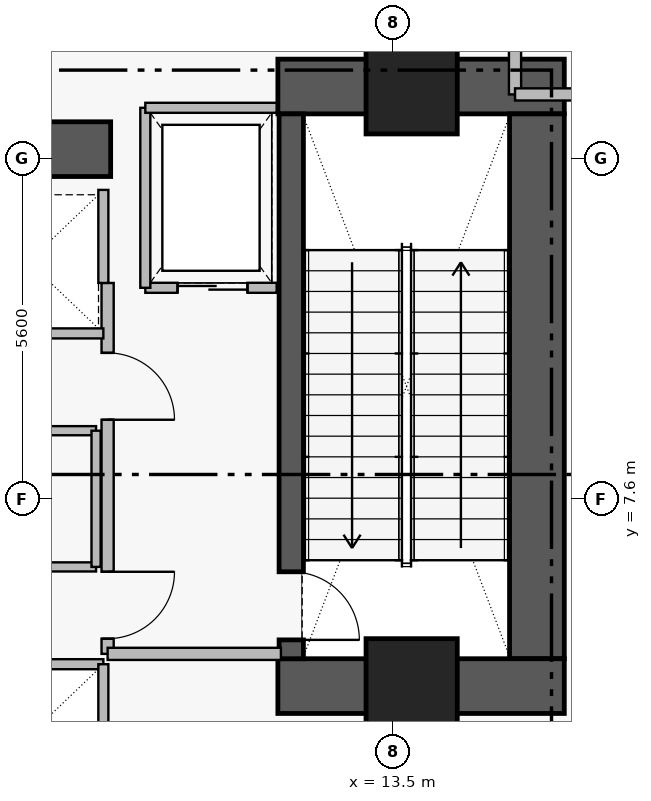
"""IFC4 building model, lengths in metres.
Left out: names, types, materials, properties, quantities, classifications, styles, units other than length and angle.
Written with IfcOpenShell. Run it as: python <this file> out.ifc"""

import sys

from ifc_helpers import new_model, si_unit, direction, frame, frame_2d, origin, origin_2d, place, context, subcontext, project, spatial, rectangle, extrude, element, fill, save


model = new_model("IFC4")
c1 = context("Model", 3, precision=1e-05, world=origin(), true_north=direction((0.0, 1.0)))
c2 = subcontext(c1, "Body", "Model", "MODEL_VIEW")
j1 = project(units=[si_unit("LENGTHUNIT", "METRE"), si_unit("PLANEANGLEUNIT", "RADIAN")], contexts=[c1])
p1 = place(None, origin())
s1 = spatial("IfcSite", under=j1, at=p1, CompositionType="ELEMENT")
p2 = place(p1, origin())
s2 = spatial("IfcBuilding", under=s1, at=p2, CompositionType="ELEMENT")
p3 = place(p2, frame((0.0, 0.0, 89.65)))
s3 = spatial("IfcBuildingStorey", under=s2, at=p3, CompositionType="ELEMENT", Elevation=89.65)
p4 = place(p3, frame((11.6, 14.38, 0.0), z_axis=(0.0, 0.0, 1.0), x_axis=(1.0, 0.0, 0.0)))
e1 = element("IfcWall", 1, at=p4, inside=s3, PredefinedType="SHEAR", context=c2, shape_type="SweptSolid", body=[
    extrude(rectangle(XDim=4.71, YDim=0.9, at=frame_2d((2.355, 0.0))), origin(), (0.0, 0.0, 1.0), 5.81),
])
p5 = place(p3, frame((15.86, 4.97, 0.0), z_axis=(0.0, 0.0, 1.0), x_axis=(0.0, 1.0, 0.0)))
e2 = element("IfcWall", 2, at=p5, inside=s3, PredefinedType="SHEAR", context=c2, shape_type="SweptSolid", body=[
    extrude(rectangle(XDim=8.96, YDim=0.9, at=frame_2d((4.48, 0.0))), origin(), (0.0, 0.0, 1.0), 5.81),
])
p6 = place(p3, frame((11.6, 4.52, 0.0), z_axis=(0.0, 0.0, 1.0), x_axis=(1.0, 0.0, 0.0)))
e3 = element("IfcWall", 3, at=p6, inside=s3, PredefinedType="SHEAR", context=c2, shape_type="SweptSolid", body=[
    extrude(rectangle(XDim=4.71, YDim=0.9, at=frame_2d((2.355, 0.0))), origin(), (0.0, 0.0, 1.0), 5.81),
])
p7 = place(p3, frame((1.25, 13.35, 0.0), z_axis=(0.0, 0.0, 1.0), x_axis=(1.0, 0.0, 0.0)))
e4 = element("IfcWall", 4, at=p7, inside=s3, PredefinedType="SHEAR", context=c2, shape_type="SweptSolid", body=[
    extrude(rectangle(XDim=7.6, YDim=0.9, at=frame_2d((3.8, 0.0))), origin(), (0.0, 0.0, 1.0), 5.74),
])
p8 = place(p3, frame((11.82, 13.93, 0.0), z_axis=(0.0, 0.0, 1.0), x_axis=(0.0, -1.0, 0.0)))
e5 = element("IfcWall", 5, at=p8, inside=s3, PredefinedType="SHEAR", context=c2, shape_type="SweptSolid", body=[
    extrude(rectangle(XDim=8.96, YDim=0.4, at=frame_2d((4.48, 0.0))), origin(), (0.0, 0.0, 1.0), 5.81),
])
p9 = place(p8, frame((7.53, 0.0, 0.0)))
e6 = element("IfcOpeningElement", 6, at=p9, cuts=e5, PredefinedType="OPENING", context=c2, shape_type="SweptSolid", body=[
    extrude(rectangle(XDim=1.12, YDim=2.22, at=frame_2d((0.56, 1.11))), frame((0.0, 0.21, 0.0), z_axis=(0.0, -1.0, 0.0), x_axis=(1.0, 0.0, 0.0)), (0.0, 0.0, 1.0), 0.42),
])
for number, where, z_axis, x_axis in (
    (7, (13.8, 14.35, 0.0), (0.0, 0.0, 1.0), (1.0, 0.0, 0.0)),
    (8, (13.8, 4.55, 0.0), (0.0, 0.0, 1.0), (1.0, 0.0, 0.0)),
):
    element("IfcColumn", number, at=place(p3, frame(where, z_axis=z_axis, x_axis=x_axis)), inside=s3, PredefinedType="COLUMN", context=c2, shape_type="SweptSolid", body=[
        extrude(rectangle(XDim=1.5, YDim=1.5, at=origin_2d()), origin(), (0.0, 0.0, 1.0), 6.0),
    ])
p10 = place(p3, frame((8.8, 11.15, 0.0), z_axis=(0.0, 0.0, 1.0), x_axis=(0.0, -1.0, 0.0)))
e9 = element("IfcWall", 9, at=p10, inside=s3, PredefinedType="PARTITIONING", context=c2, shape_type="SweptSolid", body=[
    extrude(rectangle(XDim=6.1, YDim=0.2, at=frame_2d((3.05, 0.0))), origin(), (0.0, 0.0, 1.0), 5.74),
])
p11 = place(p10, frame((1.15, 0.0, 0.0)))
e10 = element("IfcOpeningElement", 10, at=p11, cuts=e9, PredefinedType="OPENING", context=c2, shape_type="SweptSolid", body=[
    extrude(rectangle(XDim=1.1, YDim=2.2, at=frame_2d((0.55, 1.1))), frame((0.0, 0.11, 0.0), z_axis=(0.0, -1.0, 0.0), x_axis=(1.0, 0.0, 0.0)), (0.0, 0.0, 1.0), 0.22),
])
p12 = place(p10, frame((4.75, 0.0, 0.0)))
e11 = element("IfcOpeningElement", 11, at=p12, cuts=e9, PredefinedType="OPENING", context=c2, shape_type="SweptSolid", body=[
    extrude(rectangle(XDim=1.1, YDim=2.2, at=frame_2d((0.55, 1.1))), frame((0.0, 0.11, 0.0), z_axis=(0.0, -1.0, 0.0), x_axis=(1.0, 0.0, 0.0)), (0.0, 0.0, 1.0), 0.22),
])
p13 = place(p3, frame((9.42, 11.07, 0.0), z_axis=(0.0, 0.0, 1.0), x_axis=(1.0, 0.0, 0.0)))
e12 = element("IfcWall", 12, at=p13, inside=s3, PredefinedType="PARTITIONING", context=c2, shape_type="SweptSolid", body=[
    extrude(rectangle(XDim=2.16, YDim=0.165, at=frame_2d((1.08, 0.0))), origin(), (0.0, 0.0, 1.0), 5.74),
])
p14 = place(p13, frame((0.53, 0.0, 0.0)))
e13 = element("IfcOpeningElement", 13, at=p14, cuts=e12, PredefinedType="OPENING", context=c2, shape_type="SweptSolid", body=[
    extrude(rectangle(XDim=1.15, YDim=2.25, at=frame_2d((0.575, 1.125))), frame((0.0, 0.093, 0.0), z_axis=(0.0, -1.0, 0.0), x_axis=(1.0, 0.0, 0.0)), (0.0, 0.0, 1.0), 0.185),
])
p15 = place(p3, frame((4.37, 6.48, 0.0), z_axis=(0.0, 0.0, 1.0), x_axis=(1.0, 0.0, 0.0)))
e14 = element("IfcWall", 14, at=p15, inside=s3, PredefinedType="PARTITIONING", context=c2, shape_type="SweptSolid", body=[
    extrude(rectangle(XDim=4.24, YDim=0.15, at=frame_2d((2.12, 0.0))), origin(), (0.0, 0.0, 1.0), 5.74),
])
p16 = place(p15, frame((1.67, 0.0, 0.0)))
e15 = element("IfcOpeningElement", 15, at=p16, cuts=e14, PredefinedType="OPENING", context=c2, shape_type="SweptSolid", body=[
    extrude(rectangle(XDim=0.9, YDim=2.15, at=frame_2d((0.45, 1.075))), frame((0.0, 0.085, 0.0), z_axis=(0.0, -1.0, 0.0), x_axis=(1.0, 0.0, 0.0)), (0.0, 0.0, 1.0), 0.17),
])
p17 = place(p3, frame((15.5, 19.3, 0.0), z_axis=(0.0, 0.0, 1.0), x_axis=(0.0, -1.0, 0.0)))
e16 = element("IfcWall", 16, at=p17, inside=s3, PredefinedType="PARTITIONING", context=c2, shape_type="SweptSolid", body=[
    extrude(rectangle(XDim=5.05, YDim=0.2, at=frame_2d((2.525, 0.0))), origin(), (0.0, 0.0, 1.0), 5.74),
])
p18 = place(p17, frame((2.7, 0.0, 0.0)))
e17 = element("IfcOpeningElement", 17, at=p18, cuts=e16, PredefinedType="OPENING", context=c2, shape_type="SweptSolid", body=[
    extrude(rectangle(XDim=1.1, YDim=2.2, at=frame_2d((0.55, 1.1))), frame((0.0, 0.11, 0.0), z_axis=(0.0, -1.0, 0.0), x_axis=(1.0, 0.0, 0.0)), (0.0, 0.0, 1.0), 0.22),
])
p19 = place(p3, frame((8.8, 5.05, 0.0), z_axis=(0.0, 0.0, 1.0), x_axis=(1.0, 0.0, 0.0)))
e18 = element("IfcWall", 18, at=p19, inside=s3, PredefinedType="PARTITIONING", context=c2, shape_type="SweptSolid", body=[
    extrude(rectangle(XDim=2.85, YDim=0.2, at=frame_2d((1.425, 0.0))), origin(), (0.0, 0.0, 1.0), 5.74),
])
p20 = place(p3, frame((9.42, 11.07, 0.0), z_axis=(0.0, 0.0, 1.0), x_axis=(0.0, 1.0, 0.0)))
e19 = element("IfcWall", 19, at=p20, inside=s3, PredefinedType="PARTITIONING", context=c2, shape_type="SweptSolid", body=[
    extrude(rectangle(XDim=2.96, YDim=0.165, at=frame_2d((1.48, 0.0))), origin(), (0.0, 0.0, 1.0), 5.74),
])
p21 = place(p3, frame((9.42, 14.03, 0.0), z_axis=(0.0, 0.0, 1.0), x_axis=(1.0, 0.0, 0.0)))
e20 = element("IfcWall", 20, at=p21, inside=s3, PredefinedType="PARTITIONING", context=c2, shape_type="SweptSolid", body=[
    extrude(rectangle(XDim=2.16, YDim=0.165, at=frame_2d((1.08, 0.0))), origin(), (0.0, 0.0, 1.0), 5.74),
])
p22 = place(p3, frame((6.25, 4.88, 0.0), z_axis=(0.0, 0.0, 1.0), x_axis=(1.0, 0.0, 0.0)))
e21 = element("IfcWall", 21, at=p22, inside=s3, PredefinedType="PARTITIONING", context=c2, shape_type="SweptSolid", body=[
    extrude(rectangle(XDim=2.48, YDim=0.165, at=frame_2d((1.24, 0.0))), origin(), (0.0, 0.0, 1.0), 5.74),
])
p23 = place(p3, frame((8.73, 2.52, 0.0), z_axis=(0.0, 0.0, 1.0), x_axis=(0.0, 1.0, 0.0)))
e22 = element("IfcWall", 22, at=p23, inside=s3, PredefinedType="PARTITIONING", context=c2, shape_type="SweptSolid", body=[
    extrude(rectangle(XDim=2.36, YDim=0.165, at=frame_2d((1.18, 0.0))), origin(), (0.0, 0.0, 1.0), 5.74),
])
p24 = place(p3, frame((6.25, 10.32, 0.0), z_axis=(0.0, 0.0, 1.0), x_axis=(1.0, 0.0, 0.0)))
e23 = element("IfcWall", 23, at=p24, inside=s3, PredefinedType="PARTITIONING", context=c2, shape_type="SweptSolid", body=[
    extrude(rectangle(XDim=2.48, YDim=0.165, at=frame_2d((1.24, 0.0))), origin(), (0.0, 0.0, 1.0), 5.74),
])
p25 = place(p3, frame((8.73, 11.15, 0.0), z_axis=(0.0, 0.0, 1.0), x_axis=(0.0, 1.0, 0.0)))
e24 = element("IfcWall", 24, at=p25, inside=s3, PredefinedType="PARTITIONING", context=c2, shape_type="SweptSolid", body=[
    extrude(rectangle(XDim=1.53, YDim=0.165, at=frame_2d((0.765, 0.0))), origin(), (0.0, 0.0, 1.0), 5.74),
])
p26 = place(p3, frame((4.37, 8.72, 0.0), z_axis=(0.0, 0.0, 1.0), x_axis=(1.0, 0.0, 0.0)))
e25 = element("IfcWall", 25, at=p26, inside=s3, PredefinedType="PARTITIONING", context=c2, shape_type="SweptSolid", body=[
    extrude(rectangle(XDim=4.24, YDim=0.15, at=frame_2d((2.12, 0.0))), origin(), (0.0, 0.0, 1.0), 5.74),
])
p27 = place(p3, frame((8.61, 6.48, 0.0), z_axis=(0.0, 0.0, 1.0), x_axis=(0.0, 1.0, 0.0)))
e26 = element("IfcWall", 26, at=p27, inside=s3, PredefinedType="PARTITIONING", context=c2, shape_type="SweptSolid", body=[
    extrude(rectangle(XDim=2.24, YDim=0.15, at=frame_2d((1.12, 0.0))), origin(), (0.0, 0.0, 1.0), 5.74),
])
p28 = place(p3, frame((15.5, 14.25, 0.0), z_axis=(0.0, 0.0, 1.0), x_axis=(1.0, 0.0, 0.0)))
e27 = element("IfcWall", 27, at=p28, inside=s3, PredefinedType="PARTITIONING", context=c2, shape_type="SweptSolid", body=[
    extrude(rectangle(XDim=5.0, YDim=0.2, at=frame_2d((2.5, 0.0))), origin(), (0.0, 0.0, 1.0), 5.74),
])
p29 = place(p9, origin())
e28 = element("IfcDoor", 28, at=p29, inside=s3, OperationType="SINGLE_SWING_RIGHT", PredefinedType="DOOR", context=c2, shape_type="SweptSolid", body=[
    extrude(rectangle(XDim=1.12, YDim=2.22, at=frame_2d((0.56, 1.11))), frame((0.0, 0.025, 0.0), z_axis=(0.0, -1.0, 0.0), x_axis=(1.0, 0.0, 0.0)), (0.0, 0.0, 1.0), 0.05),
])
fill(e6, e28)
p30 = place(p11, origin())
e29 = element("IfcDoor", 29, at=p30, inside=s3, OperationType="SINGLE_SWING_RIGHT", PredefinedType="DOOR", context=c2, shape_type="SweptSolid", body=[
    extrude(rectangle(XDim=1.1, YDim=2.2, at=frame_2d((0.55, 1.1))), frame((0.0, 0.025, 0.0), z_axis=(0.0, -1.0, 0.0), x_axis=(1.0, 0.0, 0.0)), (0.0, 0.0, 1.0), 0.05),
])
fill(e10, e29)
p31 = place(p12, origin())
e30 = element("IfcDoor", 30, at=p31, inside=s3, OperationType="SINGLE_SWING_LEFT", PredefinedType="DOOR", context=c2, shape_type="SweptSolid", body=[
    extrude(rectangle(XDim=1.1, YDim=2.2, at=frame_2d((0.55, 1.1))), frame((0.0, 0.025, 0.0), z_axis=(0.0, -1.0, 0.0), x_axis=(1.0, 0.0, 0.0)), (0.0, 0.0, 1.0), 0.05),
])
fill(e11, e30)
p32 = place(p14, origin())
e31 = element("IfcDoor", 31, at=p32, inside=s3, OperationType="SLIDING_TO_LEFT", PredefinedType="DOOR", context=c2, shape_type="SweptSolid", body=[
    extrude(rectangle(XDim=1.15, YDim=2.25, at=frame_2d((0.575, 1.125))), frame((0.0, 0.025, 0.0), z_axis=(0.0, -1.0, 0.0), x_axis=(1.0, 0.0, 0.0)), (0.0, 0.0, 1.0), 0.05),
])
fill(e13, e31)
save(model, sys.argv[1])
